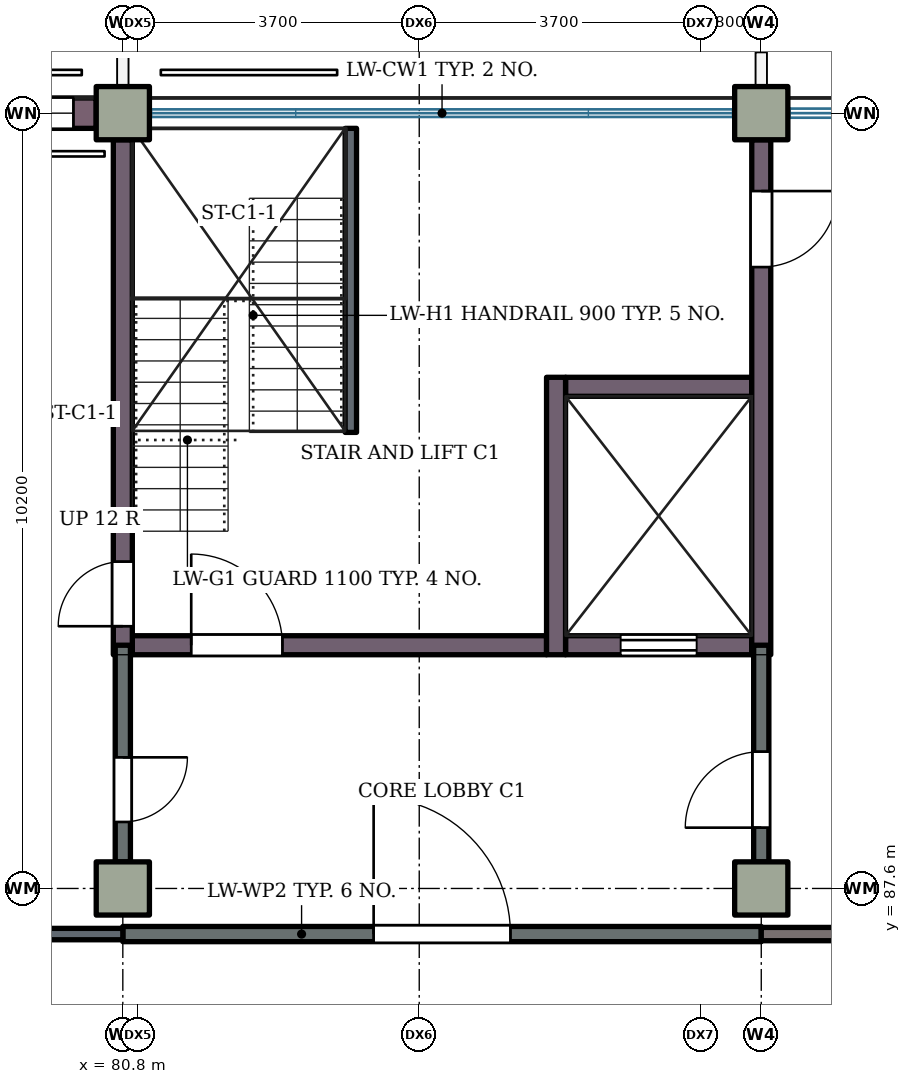
"""IFC4 building model, lengths in metres.
Left out: names, types, materials, properties, quantities, classifications, styles, units other than length and angle.
Written with IfcOpenShell. Run it as: python <this file> out.ifc"""

import sys

from ifc_helpers import new_model, si_unit, direction, frame, frame_2d, origin, origin_2d, place, context, subcontext, project, spatial, rectangle, extrude, element, fill, save


model = new_model("IFC4")
c1 = context("Model", 3, precision=1e-05, world=origin(), true_north=direction((0.0, 1.0)))
c2 = subcontext(c1, "Body", "Model", "MODEL_VIEW")
j1 = project(units=[si_unit("LENGTHUNIT", "METRE"), si_unit("PLANEANGLEUNIT", "RADIAN")], contexts=[c1])
p1 = place(None, origin())
s1 = spatial("IfcSite", under=j1, at=p1, CompositionType="ELEMENT")
p2 = place(p1, origin())
s2 = spatial("IfcBuilding", under=s1, at=p2, CompositionType="ELEMENT")
p3 = place(p2, frame((0.0, 0.0, 4.2)))
s3 = spatial("IfcBuildingStorey", under=s2, at=p3, CompositionType="ELEMENT", Elevation=4.2)
for number, where, z_axis, x_axis in (
    (1, (80.8, 87.6, 0.0), (0.0, 0.0, 1.0), (1.0, 0.0, 0.0)),
    (2, (89.2, 87.6, 0.0), (0.0, 0.0, 1.0), (1.0, 0.0, 0.0)),
    (3, (80.8, 97.8, 0.0), (0.0, 0.0, 1.0), (1.0, 0.0, 0.0)),
    (4, (89.2, 97.8, 0.0), (0.0, 0.0, 1.0), (1.0, 0.0, 0.0)),
):
    element("IfcColumn", number, at=place(p3, frame(where, z_axis=z_axis, x_axis=x_axis)), inside=s3, PredefinedType="COLUMN", context=c2, shape_type="SweptSolid", body=[
        extrude(rectangle(XDim=0.7, YDim=0.7, at=origin_2d()), origin(), (0.0, 0.0, 1.0), 4.2),
    ])
p4 = place(p3, frame((80.925, 90.8, 0.0), z_axis=(0.0, 0.0, 1.0), x_axis=(1.0, 0.0, 0.0)))
e5 = element("IfcWall", 5, at=p4, inside=s3, PredefinedType="SHEAR", context=c2, shape_type="SweptSolid", body=[
    extrude(rectangle(XDim=5.45, YDim=0.25, at=frame_2d((2.725, 0.0))), origin(), (0.0, 0.0, 1.0), 4.2),
])
p5 = place(p4, frame((0.775, 0.0, 0.0)))
e6 = element("IfcOpeningElement", 6, at=p5, cuts=e5, PredefinedType="OPENING", context=c2, shape_type="SweptSolid", body=[
    extrude(rectangle(XDim=1.2, YDim=2.1, at=frame_2d((0.6, 1.05))), frame((0.0, 0.135, 0.0), z_axis=(0.0, -1.0, 0.0), x_axis=(1.0, 0.0, 0.0)), (0.0, 0.0, 1.0), 0.27),
])
p6 = place(p3, frame((86.625, 90.8, 0.0), z_axis=(0.0, 0.0, 1.0), x_axis=(1.0, 0.0, 0.0)))
e7 = element("IfcWall", 7, at=p6, inside=s3, PredefinedType="SHEAR", context=c2, shape_type="SweptSolid", body=[
    extrude(rectangle(XDim=2.45, YDim=0.25, at=frame_2d((1.225, 0.0))), origin(), (0.0, 0.0, 1.0), 4.2),
])
p7 = place(p6, frame((0.725, 0.0, 0.0)))
e8 = element("IfcOpeningElement", 8, at=p7, cuts=e7, PredefinedType="OPENING", context=c2, shape_type="SweptSolid", body=[
    extrude(rectangle(XDim=1.0, YDim=2.1, at=frame_2d((0.5, 1.05))), frame((0.0, 0.135, 0.0), z_axis=(0.0, -1.0, 0.0), x_axis=(1.0, 0.0, 0.0)), (0.0, 0.0, 1.0), 0.27),
])
p8 = place(p3, frame((86.625, 94.2, 0.0), z_axis=(0.0, 0.0, 1.0), x_axis=(1.0, 0.0, 0.0)))
e9 = element("IfcWall", 9, at=p8, inside=s3, PredefinedType="SHEAR", context=c2, shape_type="SweptSolid", body=[
    extrude(rectangle(XDim=2.45, YDim=0.25, at=frame_2d((1.225, 0.0))), origin(), (0.0, 0.0, 1.0), 4.2),
])
p9 = place(p3, frame((80.8, 90.675, 0.0), z_axis=(0.0, 0.0, 1.0), x_axis=(0.0, 1.0, 0.0)))
e10 = element("IfcWall", 10, at=p9, inside=s3, PredefinedType="SHEAR", context=c2, shape_type="SweptSolid", body=[
    extrude(rectangle(XDim=6.775, YDim=0.25, at=frame_2d((3.387, 0.0))), origin(), (0.0, 0.0, 1.0), 4.2),
])
p10 = place(p9, frame((0.375, 0.0, 0.0)))
e11 = element("IfcOpeningElement", 11, at=p10, cuts=e10, PredefinedType="OPENING", context=c2, shape_type="SweptSolid", body=[
    extrude(rectangle(XDim=0.85, YDim=2.1, at=frame_2d((0.425, 1.05))), frame((0.0, 0.135, 0.0), z_axis=(0.0, -1.0, 0.0), x_axis=(1.0, 0.0, 0.0)), (0.0, 0.0, 1.0), 0.27),
])
p11 = place(p3, frame((86.5, 90.675, 0.0), z_axis=(0.0, 0.0, 1.0), x_axis=(0.0, 1.0, 0.0)))
e12 = element("IfcWall", 12, at=p11, inside=s3, PredefinedType="SHEAR", context=c2, shape_type="SweptSolid", body=[
    extrude(rectangle(XDim=3.65, YDim=0.25, at=frame_2d((1.825, 0.0))), origin(), (0.0, 0.0, 1.0), 4.2),
])
p12 = place(p3, frame((89.2, 90.675, 0.0), z_axis=(0.0, 0.0, 1.0), x_axis=(0.0, 1.0, 0.0)))
e13 = element("IfcWall", 13, at=p12, inside=s3, PredefinedType="SHEAR", context=c2, shape_type="SweptSolid", body=[
    extrude(rectangle(XDim=6.775, YDim=0.25, at=frame_2d((3.387, 0.0))), origin(), (0.0, 0.0, 1.0), 4.2),
])
p13 = place(p12, frame((5.1, 0.0, 0.0)))
e14 = element("IfcOpeningElement", 14, at=p13, cuts=e13, PredefinedType="OPENING", context=c2, shape_type="SweptSolid", body=[
    extrude(rectangle(XDim=1.0, YDim=2.1, at=frame_2d((0.5, 1.05))), frame((0.0, 0.135, 0.0), z_axis=(0.0, -1.0, 0.0), x_axis=(1.0, 0.0, 0.0)), (0.0, 0.0, 1.0), 0.27),
])
p14 = place(p3, frame((72.75, 97.8, 0.0), z_axis=(0.0, 0.0, 1.0), x_axis=(1.0, 0.0, 0.0)))
e15 = element("IfcWall", 15, at=p14, inside=s3, PredefinedType="SOLIDWALL", context=c2, shape_type="SweptSolid", body=[
    extrude(rectangle(XDim=7.7, YDim=0.4, at=frame_2d((3.85, 0.0))), origin(), (0.0, 0.0, 1.0), 3.32),
])
p15 = place(p14, frame((0.3, 0.0, 1.2)))
e16 = element("IfcOpeningElement", 16, at=p15, cuts=e15, PredefinedType="OPENING", context=c2, shape_type="SweptSolid", body=[
    extrude(rectangle(XDim=1.5, YDim=1.8, at=frame_2d((0.75, 0.9))), frame((0.0, 0.21, 0.0), z_axis=(0.0, -1.0, 0.0), x_axis=(1.0, 0.0, 0.0)), (0.0, 0.0, 1.0), 0.42),
])
p16 = place(p14, frame((3.1, 0.0, 1.2)))
e17 = element("IfcOpeningElement", 17, at=p16, cuts=e15, PredefinedType="OPENING", context=c2, shape_type="SweptSolid", body=[
    extrude(rectangle(XDim=1.5, YDim=1.8, at=frame_2d((0.75, 0.9))), frame((0.0, 0.21, 0.0), z_axis=(0.0, -1.0, 0.0), x_axis=(1.0, 0.0, 0.0)), (0.0, 0.0, 1.0), 0.42),
])
p17 = place(p14, frame((5.9, 0.0, 1.2)))
e18 = element("IfcOpeningElement", 18, at=p17, cuts=e15, PredefinedType="OPENING", context=c2, shape_type="SweptSolid", body=[
    extrude(rectangle(XDim=1.5, YDim=1.8, at=frame_2d((0.75, 0.9))), frame((0.0, 0.21, 0.0), z_axis=(0.0, -1.0, 0.0), x_axis=(1.0, 0.0, 0.0)), (0.0, 0.0, 1.0), 0.42),
])
p18 = place(p3, frame((80.8, 87.0, 0.0), z_axis=(0.0, 0.0, 1.0), x_axis=(1.0, 0.0, 0.0)))
e19 = element("IfcWall", 19, at=p18, inside=s3, PredefinedType="PARTITIONING", context=c2, shape_type="SweptSolid", body=[
    extrude(rectangle(XDim=8.4, YDim=0.2, at=frame_2d((4.2, 0.0))), origin(), (0.0, 0.0, 1.0), 3.92),
])
p19 = place(p18, frame((3.3, 0.0, 0.0)))
e20 = element("IfcOpeningElement", 20, at=p19, cuts=e19, PredefinedType="OPENING", context=c2, shape_type="SweptSolid", body=[
    extrude(rectangle(XDim=1.8, YDim=2.1, at=frame_2d((0.9, 1.05))), frame((0.0, 0.11, 0.0), z_axis=(0.0, -1.0, 0.0), x_axis=(1.0, 0.0, 0.0)), (0.0, 0.0, 1.0), 0.22),
])
p20 = place(p3, frame((89.2, 87.0, 0.0), z_axis=(0.0, 0.0, 1.0), x_axis=(1.0, 0.0, 0.0)))
e21 = element("IfcWall", 21, at=p20, inside=s3, PredefinedType="PARTITIONING", context=c2, shape_type="SweptSolid", body=[
    extrude(rectangle(XDim=16.8, YDim=0.175, at=frame_2d((8.4, 0.0))), origin(), (0.0, 0.0, 1.0), 3.92),
])
p21 = place(p20, frame((8.8, 0.0, 0.0)))
e22 = element("IfcOpeningElement", 22, at=p21, cuts=e21, PredefinedType="OPENING", context=c2, shape_type="SweptSolid", body=[
    extrude(rectangle(XDim=1.0, YDim=2.1, at=frame_2d((0.5, 1.05))), frame((0.0, 0.097, 0.0), z_axis=(0.0, -1.0, 0.0), x_axis=(1.0, 0.0, 0.0)), (0.0, 0.0, 1.0), 0.195),
])
p22 = place(p3, frame((72.4, 87.0, 0.0), z_axis=(0.0, 0.0, 1.0), x_axis=(1.0, 0.0, 0.0)))
e23 = element("IfcWall", 23, at=p22, inside=s3, PredefinedType="PARTITIONING", context=c2, shape_type="SweptSolid", body=[
    extrude(rectangle(XDim=8.4, YDim=0.15, at=frame_2d((4.2, 0.0))), origin(), (0.0, 0.0, 1.0), 3.92),
])
p23 = place(p22, frame((3.775, 0.0, 0.0)))
e24 = element("IfcOpeningElement", 24, at=p23, cuts=e23, PredefinedType="OPENING", context=c2, shape_type="SweptSolid", body=[
    extrude(rectangle(XDim=0.85, YDim=2.1, at=frame_2d((0.425, 1.05))), frame((0.0, 0.085, 0.0), z_axis=(0.0, -1.0, 0.0), x_axis=(1.0, 0.0, 0.0)), (0.0, 0.0, 1.0), 0.17),
])
p24 = place(p3, frame((80.8, 87.95, 0.0), z_axis=(0.0, 0.0, 1.0), x_axis=(0.0, 1.0, 0.0)))
e25 = element("IfcWall", 25, at=p24, inside=s3, PredefinedType="PARTITIONING", context=c2, shape_type="SweptSolid", body=[
    extrude(rectangle(XDim=2.85, YDim=0.2, at=frame_2d((1.425, 0.0))), origin(), (0.0, 0.0, 1.0), 3.02),
])
p25 = place(p24, frame((0.525, 0.0, 0.0)))
e26 = element("IfcOpeningElement", 26, at=p25, cuts=e25, PredefinedType="OPENING", context=c2, shape_type="SweptSolid", body=[
    extrude(rectangle(XDim=0.85, YDim=2.1, at=frame_2d((0.425, 1.05))), frame((0.0, 0.11, 0.0), z_axis=(0.0, -1.0, 0.0), x_axis=(1.0, 0.0, 0.0)), (0.0, 0.0, 1.0), 0.22),
])
p26 = place(p3, frame((89.2, 87.95, 0.0), z_axis=(0.0, 0.0, 1.0), x_axis=(0.0, 1.0, 0.0)))
e27 = element("IfcWall", 27, at=p26, inside=s3, PredefinedType="PARTITIONING", context=c2, shape_type="SweptSolid", body=[
    extrude(rectangle(XDim=2.85, YDim=0.2, at=frame_2d((1.425, 0.0))), origin(), (0.0, 0.0, 1.0), 3.02),
])
p27 = place(p26, frame((0.45, 0.0, 0.0)))
e28 = element("IfcOpeningElement", 28, at=p27, cuts=e27, PredefinedType="OPENING", context=c2, shape_type="SweptSolid", body=[
    extrude(rectangle(XDim=1.0, YDim=2.1, at=frame_2d((0.5, 1.05))), frame((0.0, 0.11, 0.0), z_axis=(0.0, -1.0, 0.0), x_axis=(1.0, 0.0, 0.0)), (0.0, 0.0, 1.0), 0.22),
])
p28 = place(p3, frame((83.8, 93.6, 0.0), z_axis=(0.0, 0.0, 1.0), x_axis=(0.0, 1.0, 0.0)))
e29 = element("IfcWall", 29, at=p28, inside=s3, PredefinedType="PARTITIONING", context=c2, shape_type="SweptSolid", body=[
    extrude(rectangle(XDim=4.0, YDim=0.15, at=frame_2d((2.0, 0.0))), origin(), (0.0, 0.0, 1.0), 3.92),
])
p29 = place(p17, origin())
e30 = element("IfcWindow", 30, at=p29, inside=s3, PartitioningType="SINGLE_PANEL", PredefinedType="WINDOW", context=c2, shape_type="SweptSolid", body=[
    extrude(rectangle(XDim=1.5, YDim=1.8, at=frame_2d((0.75, 0.9))), frame((0.0, 0.03, 0.0), z_axis=(0.0, -1.0, 0.0), x_axis=(1.0, 0.0, 0.0)), (0.0, 0.0, 1.0), 0.06),
])
fill(e18, e30)
p30 = place(p25, origin())
e31 = element("IfcDoor", 31, at=p30, inside=s3, OperationType="SINGLE_SWING_RIGHT", PredefinedType="DOOR", context=c2, shape_type="SweptSolid", body=[
    extrude(rectangle(XDim=0.85, YDim=2.1, at=frame_2d((0.425, 1.05))), frame((0.0, 0.025, 0.0), z_axis=(0.0, -1.0, 0.0), x_axis=(1.0, 0.0, 0.0)), (0.0, 0.0, 1.0), 0.05),
])
fill(e26, e31)
p31 = place(p10, origin())
e32 = element("IfcDoor", 32, at=p31, inside=s3, OperationType="SINGLE_SWING_LEFT", PredefinedType="DOOR", context=c2, shape_type="SweptSolid", body=[
    extrude(rectangle(XDim=0.85, YDim=2.1, at=frame_2d((0.425, 1.05))), frame((0.0, 0.025, 0.0), z_axis=(0.0, -1.0, 0.0), x_axis=(1.0, 0.0, 0.0)), (0.0, 0.0, 1.0), 0.05),
])
fill(e11, e32)
p32 = place(p27, origin())
e33 = element("IfcDoor", 33, at=p32, inside=s3, OperationType="SINGLE_SWING_LEFT", PredefinedType="DOOR", context=c2, shape_type="SweptSolid", body=[
    extrude(rectangle(XDim=1.0, YDim=2.1, at=frame_2d((0.5, 1.05))), frame((0.0, 0.025, 0.0), z_axis=(0.0, -1.0, 0.0), x_axis=(1.0, 0.0, 0.0)), (0.0, 0.0, 1.0), 0.05),
])
fill(e28, e33)
p33 = place(p13, origin())
e34 = element("IfcDoor", 34, at=p33, inside=s3, OperationType="SINGLE_SWING_RIGHT", PredefinedType="DOOR", context=c2, shape_type="SweptSolid", body=[
    extrude(rectangle(XDim=1.0, YDim=2.1, at=frame_2d((0.5, 1.05))), frame((0.0, 0.025, 0.0), z_axis=(0.0, -1.0, 0.0), x_axis=(1.0, 0.0, 0.0)), (0.0, 0.0, 1.0), 0.05),
])
fill(e14, e34)
p34 = place(p19, origin())
e35 = element("IfcDoor", 35, at=p34, inside=s3, OperationType="DOUBLE_DOOR_SINGLE_SWING", PredefinedType="DOOR", context=c2, shape_type="SweptSolid", body=[
    extrude(rectangle(XDim=1.8, YDim=2.1, at=frame_2d((0.9, 1.05))), frame((0.0, 0.025, 0.0), z_axis=(0.0, -1.0, 0.0), x_axis=(1.0, 0.0, 0.0)), (0.0, 0.0, 1.0), 0.05),
])
fill(e20, e35)
p35 = place(p5, origin())
e36 = element("IfcDoor", 36, at=p35, inside=s3, OperationType="SINGLE_SWING_LEFT", PredefinedType="DOOR", context=c2, shape_type="SweptSolid", body=[
    extrude(rectangle(XDim=1.2, YDim=2.1, at=frame_2d((0.6, 1.05))), frame((0.0, 0.025, 0.0), z_axis=(0.0, -1.0, 0.0), x_axis=(1.0, 0.0, 0.0)), (0.0, 0.0, 1.0), 0.05),
])
fill(e6, e36)
p36 = place(p7, origin())
e37 = element("IfcDoor", 37, at=p36, inside=s3, OperationType="SLIDING_TO_LEFT", PredefinedType="DOOR", context=c2, shape_type="SweptSolid", body=[
    extrude(rectangle(XDim=1.0, YDim=2.1, at=frame_2d((0.5, 1.05))), frame((0.0, 0.025, 0.0), z_axis=(0.0, -1.0, 0.0), x_axis=(1.0, 0.0, 0.0)), (0.0, 0.0, 1.0), 0.05),
])
fill(e8, e37)
save(model, sys.argv[1])
